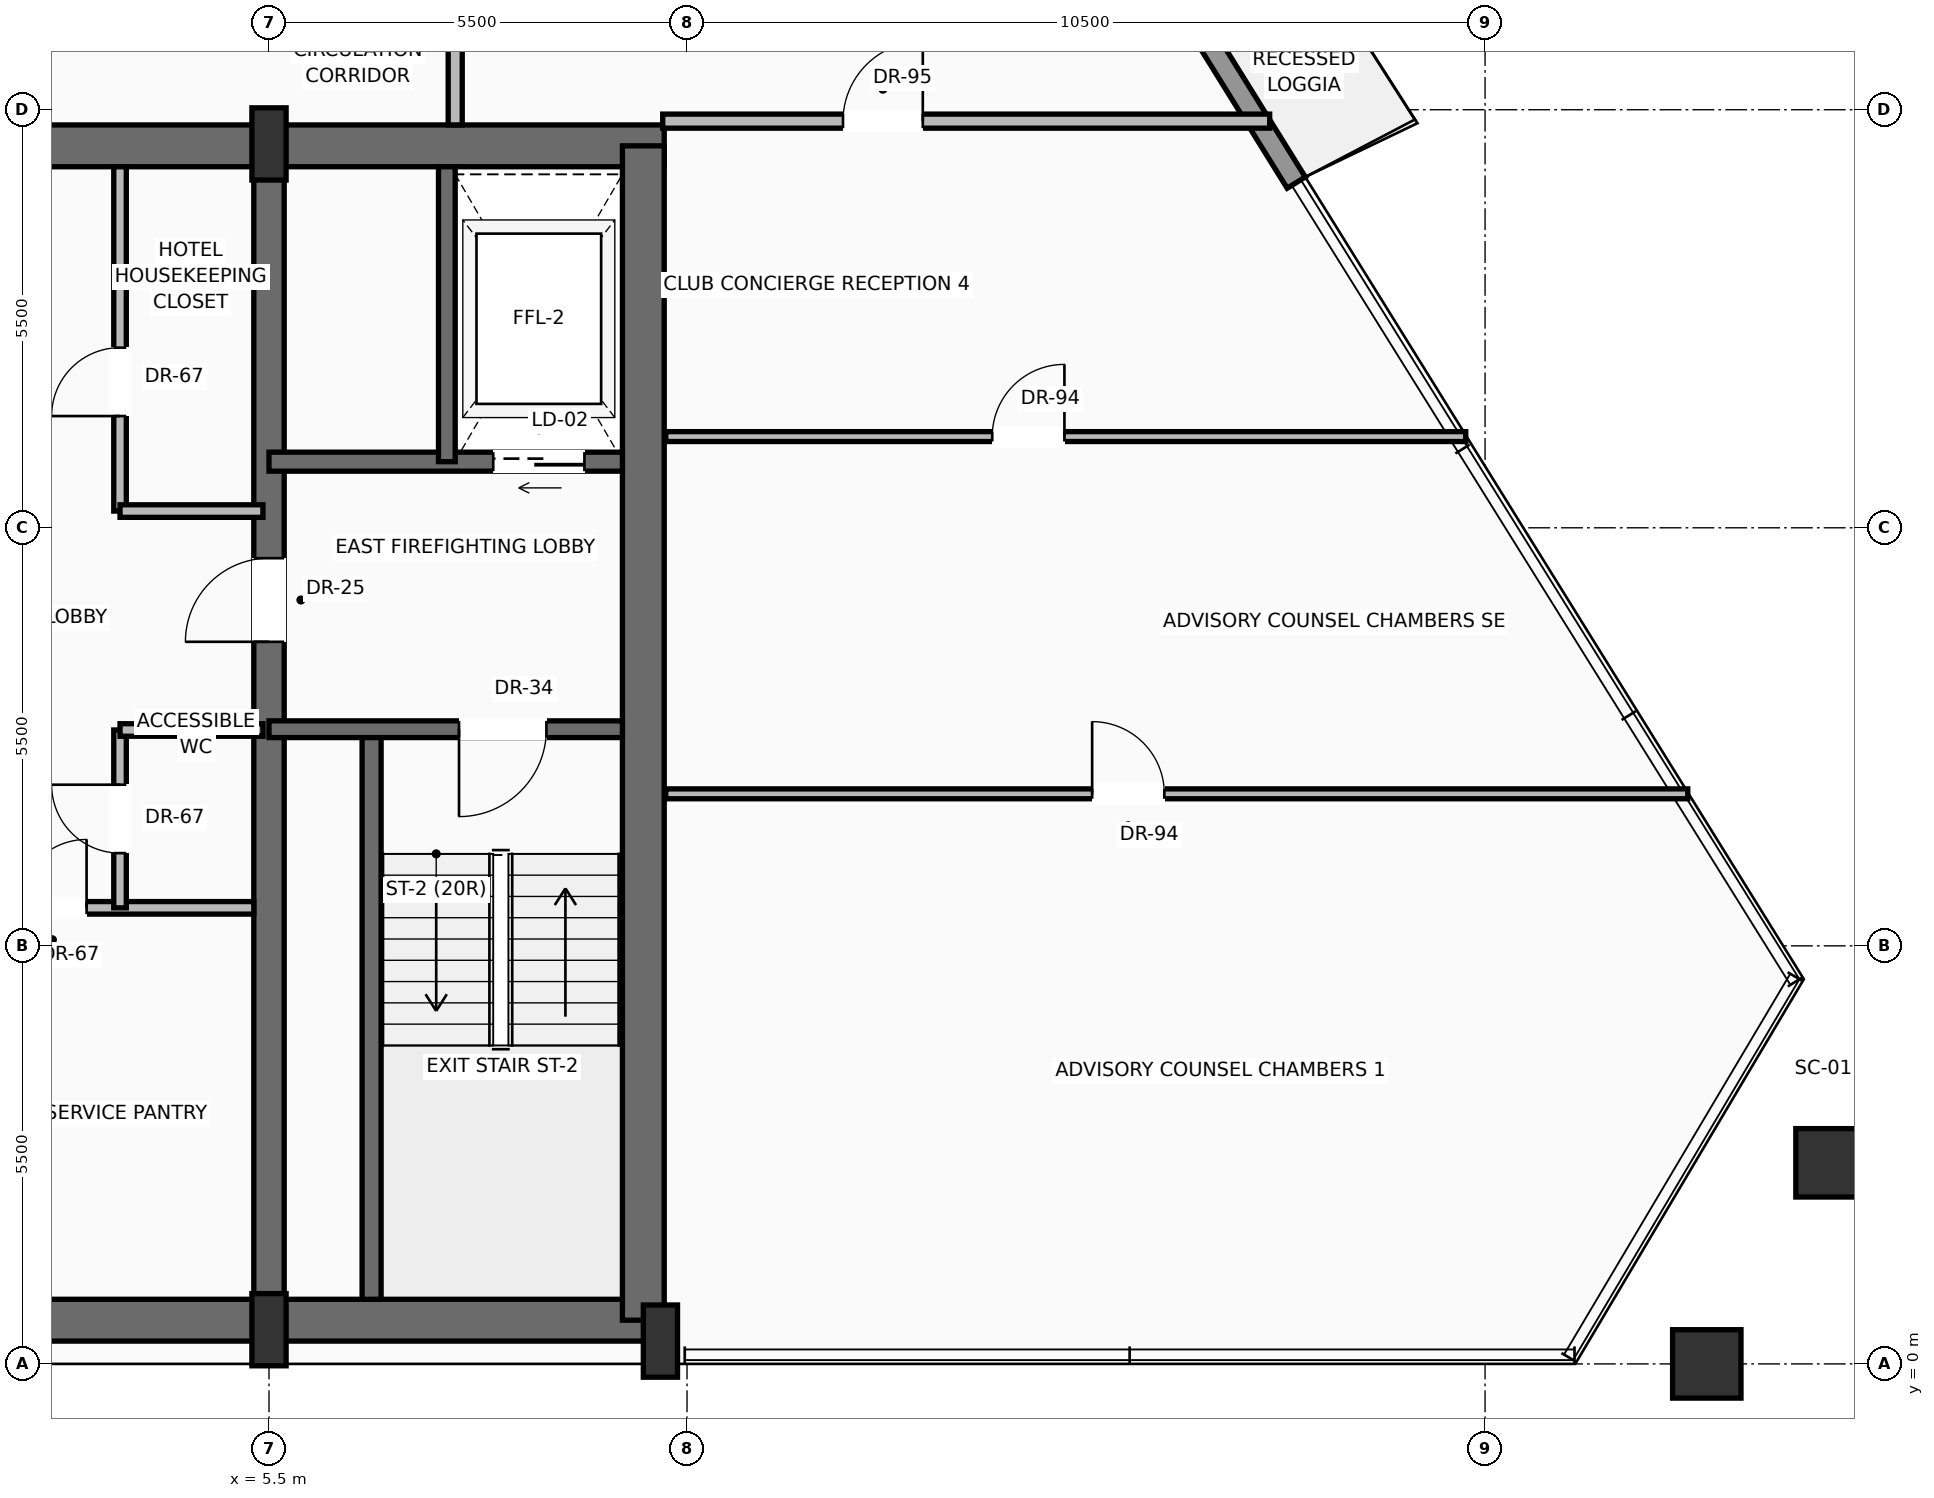
"""IFC4 building model, lengths in metres.
Left out: names, types, materials, properties, quantities, classifications, styles, units other than length and angle.
Written with IfcOpenShell. Run it as: python <this file> out.ifc"""

import sys

from ifc_helpers import new_model, si_unit, direction, frame, frame_2d, origin, origin_2d, place, context, subcontext, project, spatial, rectangle, hollow_rectangle, extrude, source, transform, mapped, element, fill, save


model = new_model("IFC4")
c1 = context("Model", 3, precision=1e-05, world=origin(), true_north=direction((0.0, 1.0)))
c2 = subcontext(c1, "Body", "Model", "MODEL_VIEW")
j1 = project(units=[si_unit("LENGTHUNIT", "METRE"), si_unit("PLANEANGLEUNIT", "RADIAN")], contexts=[c1])
p1 = place(None, origin())
s1 = spatial("IfcSite", under=j1, at=p1, CompositionType="ELEMENT")
p2 = place(p1, origin())
s2 = spatial("IfcBuilding", under=s1, at=p2, CompositionType="ELEMENT")
p3 = place(p2, frame((0.0, 0.0, 230.35)))
s3 = spatial("IfcBuildingStorey", under=s2, at=p3, CompositionType="ELEMENT", Elevation=230.35)
p4 = place(p3, frame((-10.65, 0.575, 0.0), z_axis=(0.0, 0.0, 1.0), x_axis=(1.0, 0.0, 0.0)))
e1 = element("IfcWall", 1, at=p4, inside=s3, PredefinedType="SHEAR", context=c2, shape_type="SweptSolid", body=[
    extrude(rectangle(XDim=21.3, YDim=0.55, at=frame_2d((10.65, 0.0))), origin(), (0.0, 0.0, 1.0), 3.24),
])
p5 = place(p3, frame((-10.7, 16.025, 0.0), z_axis=(0.0, 0.0, 1.0), x_axis=(1.0, 0.0, 0.0)))
e2 = element("IfcWall", 2, at=p5, inside=s3, PredefinedType="SHEAR", context=c2, shape_type="SweptSolid", body=[
    extrude(rectangle(XDim=21.4, YDim=0.55, at=frame_2d((10.7, 0.0))), origin(), (0.0, 0.0, 1.0), 3.24),
])
p6 = place(p5, frame((3.27, 0.0, 0.0)))
e3 = element("IfcOpeningElement", 3, at=p6, cuts=e2, PredefinedType="OPENING", context=c2, shape_type="SweptSolid", body=[
    extrude(rectangle(XDim=1.3, YDim=2.3, at=frame_2d((0.65, 1.15))), frame((0.0, 0.285, 0.0), z_axis=(0.0, -1.0, 0.0), x_axis=(1.0, 0.0, 0.0)), (0.0, 0.0, 1.0), 0.57),
])
p7 = place(p5, frame((9.7, 0.0, 0.0)))
e4 = element("IfcOpeningElement", 4, at=p7, cuts=e2, PredefinedType="OPENING", context=c2, shape_type="SweptSolid", body=[
    extrude(rectangle(XDim=2.0, YDim=2.4, at=frame_2d((1.0, 1.2))), frame((0.0, 0.285, 0.0), z_axis=(0.0, -1.0, 0.0), x_axis=(1.0, 0.0, 0.0)), (0.0, 0.0, 1.0), 0.57),
])
p8 = place(p3, frame((10.425, 0.575, 0.0), z_axis=(0.0, 0.0, 1.0), x_axis=(0.0, 1.0, 0.0)))
e5 = element("IfcWall", 5, at=p8, inside=s3, PredefinedType="SHEAR", context=c2, shape_type="SweptSolid", body=[
    extrude(rectangle(XDim=15.45, YDim=0.55, at=frame_2d((7.725, 0.0))), origin(), (0.0, 0.0, 1.0), 3.24),
])
p9 = place(p3, frame((5.5, 0.575, 0.0), z_axis=(0.0, 0.0, 1.0), x_axis=(0.0, 1.0, 0.0)))
e6 = element("IfcWall", 6, at=p9, inside=s3, PredefinedType="SHEAR", context=c2, shape_type="SweptSolid", body=[
    extrude(rectangle(XDim=15.45, YDim=0.4, at=frame_2d((7.725, 0.0))), origin(), (0.0, 0.0, 1.0), 3.24),
])
p10 = place(p9, frame((8.925, 0.0, 0.0)))
e7 = element("IfcOpeningElement", 7, at=p10, cuts=e6, PredefinedType="OPENING", context=c2, shape_type="SweptSolid", body=[
    extrude(rectangle(XDim=1.1, YDim=2.2, at=frame_2d((0.55, 1.1))), frame((0.0, 0.21, 0.0), z_axis=(0.0, -1.0, 0.0), x_axis=(1.0, 0.0, 0.0)), (0.0, 0.0, 1.0), 0.42),
])
m1 = source(origin(), c2, "Body", "SweptSolid", [
    extrude(rectangle(XDim=0.45, YDim=0.95, at=origin_2d()), origin(), (0.0, 0.0, 1.0), 3.45),
])
for number, where, z_axis, x_axis in (
    (8, (5.5, 0.45, 0.0), (0.0, 0.0, 1.0), (1.0, 0.0, 0.0)),
    (9, (10.65, 0.3, 0.0), (0.0, 0.0, 1.0), (1.0, 0.0, 0.0)),
    (10, (5.5, 16.05, 0.0), (0.0, 0.0, 1.0), (1.0, 0.0, 0.0)),
):
    element("IfcColumn", number, at=place(p3, frame(where, z_axis=z_axis, x_axis=x_axis)), inside=s3, PredefinedType="PILASTER", context=c2, shape_type="MappedRepresentation", body=[
        mapped(m1, transform((0.0, 0.0, 0.0), scale=1.0)),
    ])
m2 = source(origin(), c2, "Body", "SweptSolid", [
    extrude(hollow_rectangle(XDim=0.9, YDim=0.9, WallThickness=0.045, at=origin_2d()), origin(), (0.0, 0.0, 1.0), 3.441),
])
p11 = place(p3, frame((24.417, 0.0, 0.004), z_axis=(0.002057462832, 0.0, 0.999997883421), x_axis=(0.0, 1.0, 0.0)))
e11 = element("IfcColumn", 11, at=p11, inside=s3, PredefinedType="COLUMN", context=c2, shape_type="MappedRepresentation", body=[
    mapped(m2, transform((0.0, 0.0, 0.0), scale=1.0)),
])
m3 = source(origin(), c2, "Body", "SweptSolid", [
    extrude(hollow_rectangle(XDim=0.9, YDim=0.9, WallThickness=0.045, at=origin_2d()), origin(), (0.0, 0.0, 1.0), 3.442),
])
p12 = place(p3, frame((26.039, 2.646, 0.004), z_axis=(-0.00929239417, -0.016598627754, 0.999819052113), x_axis=(0.872569595673, -0.488489816381, 0.0)))
e12 = element("IfcColumn", 12, at=p12, inside=s3, PredefinedType="COLUMN", context=c2, shape_type="MappedRepresentation", body=[
    mapped(m3, transform((0.0, 0.0, 0.0), scale=1.0)),
])
p13 = place(p3, frame((8.708, 32.125, 0.0), z_axis=(0.0, 0.0, 1.0), x_axis=(0.527896829345, -0.849308505531, 0.0)))
e13 = element("IfcWall", 13, at=p13, inside=s3, PredefinedType="SOLIDWALL", context=c2, shape_type="SweptSolid", body=[
    extrude(rectangle(XDim=19.527, YDim=0.28, at=frame_2d((9.763, 0.0))), origin(), (0.0, 0.0, 1.0), 2.82),
])
p14 = place(p13, frame((4.686, 0.0, 0.0)))
e14 = element("IfcOpeningElement", 14, at=p14, cuts=e13, PredefinedType="OPENING", context=c2, shape_type="SweptSolid", body=[
    extrude(rectangle(XDim=1.6, YDim=2.35, at=frame_2d((0.8, 1.175))), frame((0.0, 0.15, 0.0), z_axis=(0.0, -1.0, 0.0), x_axis=(1.0, 0.0, 0.0)), (0.0, 0.0, 1.0), 0.3),
])
p15 = place(p13, frame((13.278, 0.0, 0.9)))
e15 = element("IfcOpeningElement", 15, at=p15, cuts=e13, PredefinedType="OPENING", context=c2, shape_type="SweptSolid", body=[
    extrude(rectangle(XDim=1.55, YDim=1.75, at=frame_2d((0.775, 0.875))), frame((0.0, 0.15, 0.0), z_axis=(0.0, -1.0, 0.0), x_axis=(1.0, 0.0, 0.0)), (0.0, 0.0, 1.0), 0.3),
])
p16 = place(p3, frame((6.85, 0.85, 0.0), z_axis=(0.0, 0.0, 1.0), x_axis=(0.0, 1.0, 0.0)))
e16 = element("IfcWall", 16, at=p16, inside=s3, PredefinedType="SOLIDWALL", context=c2, shape_type="SweptSolid", body=[
    extrude(rectangle(XDim=7.5, YDim=0.25, at=frame_2d((3.75, 0.0))), origin(), (0.0, 0.0, 1.0), 3.24),
])
p17 = place(p3, frame((10.15, 8.35, 0.0), z_axis=(0.0, 0.0, 1.0), x_axis=(-1.0, 0.0, 0.0)))
e17 = element("IfcWall", 17, at=p17, inside=s3, PredefinedType="SOLIDWALL", context=c2, shape_type="SweptSolid", body=[
    extrude(rectangle(XDim=4.65, YDim=0.22, at=frame_2d((2.325, 0.0))), origin(), (0.0, 0.0, 1.0), 3.24),
])
p18 = place(p17, frame((1.0, 0.0, 0.0)))
e18 = element("IfcOpeningElement", 18, at=p18, cuts=e17, PredefinedType="OPENING", context=c2, shape_type="SweptSolid", body=[
    extrude(rectangle(XDim=1.15, YDim=2.2, at=frame_2d((0.575, 1.1))), frame((0.0, 0.12, 0.0), z_axis=(0.0, -1.0, 0.0), x_axis=(1.0, 0.0, 0.0)), (0.0, 0.0, 1.0), 0.24),
])
p19 = place(p3, frame((10.15, 11.87, 0.0), z_axis=(0.0, 0.0, 1.0), x_axis=(-1.0, 0.0, 0.0)))
e19 = element("IfcWall", 19, at=p19, inside=s3, PredefinedType="SOLIDWALL", context=c2, shape_type="SweptSolid", body=[
    extrude(rectangle(XDim=4.65, YDim=0.25, at=frame_2d((2.325, 0.0))), origin(), (0.0, 0.0, 1.0), 3.24),
])
p20 = place(p19, frame((0.5, 0.0, 0.0)))
e20 = element("IfcOpeningElement", 20, at=p20, cuts=e19, PredefinedType="OPENING", context=c2, shape_type="SweptSolid", body=[
    extrude(rectangle(XDim=1.2, YDim=2.25, at=frame_2d((0.6, 1.125))), frame((0.0, 0.135, 0.0), z_axis=(0.0, -1.0, 0.0), x_axis=(1.0, 0.0, 0.0)), (0.0, 0.0, 1.0), 0.27),
])
p21 = place(p3, frame((7.84, 11.87, 0.0), z_axis=(0.0, 0.0, 1.0), x_axis=(0.0, 1.0, 0.0)))
e21 = element("IfcWall", 21, at=p21, inside=s3, PredefinedType="SOLIDWALL", context=c2, shape_type="SweptSolid", body=[
    extrude(rectangle(XDim=3.88, YDim=0.22, at=frame_2d((1.94, 0.0))), origin(), (0.0, 0.0, 1.0), 3.24),
])
p22 = place(p3, frame((-5.5, 6.0, 0.0), z_axis=(0.0, 0.0, 1.0), x_axis=(1.0, 0.0, 0.0)))
e22 = element("IfcWall", 22, at=p22, inside=s3, PredefinedType="PARTITIONING", context=c2, shape_type="SweptSolid", body=[
    extrude(rectangle(XDim=10.8, YDim=0.165, at=frame_2d((5.4, 0.0))), origin(), (0.0, 0.0, 1.0), 3.232),
])
p23 = place(p22, frame((7.7, 0.0, 0.0)))
e23 = element("IfcOpeningElement", 23, at=p23, cuts=e22, PredefinedType="OPENING", context=c2, shape_type="SweptSolid", body=[
    extrude(rectangle(XDim=0.9, YDim=2.1, at=frame_2d((0.45, 1.05))), frame((0.0, 0.093, 0.0), z_axis=(0.0, -1.0, 0.0), x_axis=(1.0, 0.0, 0.0)), (0.0, 0.0, 1.0), 0.185),
])
p24 = place(p3, frame((3.54, 6.0, 0.0), z_axis=(0.0, 0.0, 1.0), x_axis=(0.0, 1.0, 0.0)))
e24 = element("IfcWall", 24, at=p24, inside=s3, PredefinedType="PARTITIONING", context=c2, shape_type="SweptSolid", body=[
    extrude(rectangle(XDim=2.34, YDim=0.165, at=frame_2d((1.17, 0.0))), origin(), (0.0, 0.0, 1.0), 3.232),
])
p25 = place(p24, frame((0.72, 0.0, 0.0)))
e25 = element("IfcOpeningElement", 25, at=p25, cuts=e24, PredefinedType="OPENING", context=c2, shape_type="SweptSolid", body=[
    extrude(rectangle(XDim=0.9, YDim=2.1, at=frame_2d((0.45, 1.05))), frame((0.0, 0.093, 0.0), z_axis=(0.0, -1.0, 0.0), x_axis=(1.0, 0.0, 0.0)), (0.0, 0.0, 1.0), 0.185),
])
p26 = place(p3, frame((3.54, 8.34, 0.0), z_axis=(0.0, 0.0, 1.0), x_axis=(1.0, 0.0, 0.0)))
e26 = element("IfcWall", 26, at=p26, inside=s3, PredefinedType="PARTITIONING", context=c2, shape_type="SweptSolid", body=[
    extrude(rectangle(XDim=1.88, YDim=0.165, at=frame_2d((0.94, 0.0))), origin(), (0.0, 0.0, 1.0), 3.232),
])
p27 = place(p3, frame((3.54, 11.22, 0.0), z_axis=(0.0, 0.0, 1.0), x_axis=(0.0, 1.0, 0.0)))
e27 = element("IfcWall", 27, at=p27, inside=s3, PredefinedType="PARTITIONING", context=c2, shape_type="SweptSolid", body=[
    extrude(rectangle(XDim=4.53, YDim=0.165, at=frame_2d((2.265, 0.0))), origin(), (0.0, 0.0, 1.0), 3.232),
])
p28 = place(p27, frame((1.25, 0.0, 0.0)))
e28 = element("IfcOpeningElement", 28, at=p28, cuts=e27, PredefinedType="OPENING", context=c2, shape_type="SweptSolid", body=[
    extrude(rectangle(XDim=0.9, YDim=2.1, at=frame_2d((0.45, 1.05))), frame((0.0, 0.093, 0.0), z_axis=(0.0, -1.0, 0.0), x_axis=(1.0, 0.0, 0.0)), (0.0, 0.0, 1.0), 0.185),
])
p29 = place(p3, frame((3.54, 11.22, 0.0), z_axis=(0.0, 0.0, 1.0), x_axis=(1.0, 0.0, 0.0)))
e29 = element("IfcWall", 29, at=p29, inside=s3, PredefinedType="PARTITIONING", context=c2, shape_type="SweptSolid", body=[
    extrude(rectangle(XDim=1.88, YDim=0.165, at=frame_2d((0.94, 0.0))), origin(), (0.0, 0.0, 1.0), 3.232),
])
p30 = place(p3, frame((7.95, 16.3, 0.0), z_axis=(0.0, 0.0, 1.0), x_axis=(0.0, 1.0, 0.0)))
e30 = element("IfcWall", 30, at=p30, inside=s3, PredefinedType="PARTITIONING", context=c2, shape_type="SweptSolid", body=[
    extrude(rectangle(XDim=10.5, YDim=0.185, at=frame_2d((5.25, 0.0))), origin(), (0.0, 0.0, 1.0), 3.232),
])
p31 = place(p30, frame((3.088, 0.0, 0.0)))
e31 = element("IfcOpeningElement", 31, at=p31, cuts=e30, PredefinedType="OPENING", context=c2, shape_type="SweptSolid", body=[
    extrude(rectangle(XDim=1.05, YDim=2.25, at=frame_2d((0.525, 1.125))), frame((0.0, 0.103, 0.0), z_axis=(0.0, -1.0, 0.0), x_axis=(1.0, 0.0, 0.0)), (0.0, 0.0, 1.0), 0.205),
])
p32 = place(p3, frame((10.68, 16.35, 0.0), z_axis=(0.0, 0.0, 1.0), x_axis=(1.0, 0.0, 0.0)))
e32 = element("IfcWall", 32, at=p32, inside=s3, PredefinedType="PARTITIONING", context=c2, shape_type="SweptSolid", body=[
    extrude(rectangle(XDim=7.986, YDim=0.185, at=frame_2d((3.993, 0.0))), origin(), (0.0, 0.0, 1.0), 3.232),
])
p33 = place(p32, frame((2.372, 0.0, 0.0)))
e33 = element("IfcOpeningElement", 33, at=p33, cuts=e32, PredefinedType="OPENING", context=c2, shape_type="SweptSolid", body=[
    extrude(rectangle(XDim=1.05, YDim=2.25, at=frame_2d((0.525, 1.125))), frame((0.0, 0.103, 0.0), z_axis=(0.0, -1.0, 0.0), x_axis=(1.0, 0.0, 0.0)), (0.0, 0.0, 1.0), 0.205),
])
p34 = place(p3, frame((10.72, 7.5, 0.0), z_axis=(0.0, 0.0, 1.0), x_axis=(1.0, 0.0, 0.0)))
e34 = element("IfcWall", 34, at=p34, inside=s3, PredefinedType="PARTITIONING", context=c2, shape_type="SweptSolid", body=[
    extrude(rectangle(XDim=13.447, YDim=0.13, at=frame_2d((6.724, 0.0))), origin(), (0.0, 0.0, 1.0), 3.232),
])
p35 = place(p34, frame((5.61, 0.0, 0.0)))
e35 = element("IfcOpeningElement", 35, at=p35, cuts=e34, PredefinedType="OPENING", context=c2, shape_type="SweptSolid", body=[
    extrude(rectangle(XDim=0.95, YDim=2.2, at=frame_2d((0.475, 1.1))), frame((0.0, 0.075, 0.0), z_axis=(0.0, -1.0, 0.0), x_axis=(1.0, 0.0, 0.0)), (0.0, 0.0, 1.0), 0.15),
])
p36 = place(p3, frame((10.72, 12.2, 0.0), z_axis=(0.0, 0.0, 1.0), x_axis=(1.0, 0.0, 0.0)))
e36 = element("IfcWall", 36, at=p36, inside=s3, PredefinedType="PARTITIONING", context=c2, shape_type="SweptSolid", body=[
    extrude(rectangle(XDim=10.526, YDim=0.13, at=frame_2d((5.263, 0.0))), origin(), (0.0, 0.0, 1.0), 3.232),
])
p37 = place(p36, frame((4.295, 0.0, 0.0)))
e37 = element("IfcOpeningElement", 37, at=p37, cuts=e36, PredefinedType="OPENING", context=c2, shape_type="SweptSolid", body=[
    extrude(rectangle(XDim=0.95, YDim=2.2, at=frame_2d((0.475, 1.1))), frame((0.0, 0.075, 0.0), z_axis=(0.0, -1.0, 0.0), x_axis=(1.0, 0.0, 0.0)), (0.0, 0.0, 1.0), 0.15),
])
m4 = source(origin(), c2, "Body", "SweptSolid", [
    extrude(rectangle(XDim=1.15, YDim=2.2, at=frame_2d((0.575, 1.1))), frame((0.0, 0.025, 0.0), z_axis=(0.0, -1.0, 0.0), x_axis=(1.0, 0.0, 0.0)), (0.0, 0.0, 1.0), 0.05),
])
p38 = place(p18, origin())
e38 = element("IfcDoor", 38, at=p38, inside=s3, OperationType="SINGLE_SWING_RIGHT", PredefinedType="DOOR", context=c2, shape_type="MappedRepresentation", body=[
    mapped(m4, transform((0.0, 0.0, 0.0), scale=1.0)),
])
fill(e18, e38)
m5 = source(origin(), c2, "Body", "SweptSolid", [
    extrude(rectangle(XDim=1.1, YDim=2.2, at=frame_2d((0.55, 1.1))), frame((0.0, 0.025, 0.0), z_axis=(0.0, -1.0, 0.0), x_axis=(1.0, 0.0, 0.0)), (0.0, 0.0, 1.0), 0.05),
])
p39 = place(p10, origin())
e39 = element("IfcDoor", 39, at=p39, inside=s3, OperationType="SINGLE_SWING_LEFT", PredefinedType="DOOR", context=c2, shape_type="MappedRepresentation", body=[
    mapped(m5, transform((0.0, 0.0, 0.0), scale=1.0)),
])
fill(e7, e39)
m6 = source(origin(), c2, "Body", "SweptSolid", [
    extrude(rectangle(XDim=1.2, YDim=2.25, at=frame_2d((0.6, 1.125))), frame((0.0, 0.025, 0.0), z_axis=(0.0, -1.0, 0.0), x_axis=(1.0, 0.0, 0.0)), (0.0, 0.0, 1.0), 0.05),
])
p40 = place(p20, origin())
e40 = element("IfcDoor", 40, at=p40, inside=s3, OperationType="SLIDING_TO_RIGHT", PredefinedType="DOOR", context=c2, shape_type="MappedRepresentation", body=[
    mapped(m6, transform((0.0, 0.0, 0.0), scale=1.0)),
])
fill(e20, e40)
m7 = source(origin(), c2, "Body", "SweptSolid", [
    extrude(rectangle(XDim=0.9, YDim=2.1, at=frame_2d((0.45, 1.05))), frame((0.0, 0.025, 0.0), z_axis=(0.0, -1.0, 0.0), x_axis=(1.0, 0.0, 0.0)), (0.0, 0.0, 1.0), 0.05),
])
p41 = place(p23, origin())
e41 = element("IfcDoor", 41, at=p41, inside=s3, OperationType="SINGLE_SWING_RIGHT", PredefinedType="DOOR", context=c2, shape_type="MappedRepresentation", body=[
    mapped(m7, transform((0.0, 0.0, 0.0), scale=1.0)),
])
fill(e23, e41)
p42 = place(p25, origin())
e42 = element("IfcDoor", 42, at=p42, inside=s3, OperationType="SINGLE_SWING_RIGHT", PredefinedType="DOOR", context=c2, shape_type="MappedRepresentation", body=[
    mapped(m7, transform((0.0, 0.0, 0.0), scale=1.0)),
])
fill(e25, e42)
p43 = place(p28, origin())
e43 = element("IfcDoor", 43, at=p43, inside=s3, OperationType="SINGLE_SWING_LEFT", PredefinedType="DOOR", context=c2, shape_type="MappedRepresentation", body=[
    mapped(m7, transform((0.0, 0.0, 0.0), scale=1.0)),
])
fill(e28, e43)
m8 = source(origin(), c2, "Body", "SweptSolid", [
    extrude(rectangle(XDim=1.05, YDim=2.25, at=frame_2d((0.525, 1.125))), frame((0.0, 0.025, 0.0), z_axis=(0.0, -1.0, 0.0), x_axis=(1.0, 0.0, 0.0)), (0.0, 0.0, 1.0), 0.05),
])
p44 = place(p33, origin())
e44 = element("IfcDoor", 44, at=p44, inside=s3, OperationType="SINGLE_SWING_RIGHT", PredefinedType="DOOR", context=c2, shape_type="MappedRepresentation", body=[
    mapped(m8, transform((0.0, 0.0, 0.0), scale=1.0)),
])
fill(e33, e44)
m9 = source(origin(), c2, "Body", "SweptSolid", [
    extrude(rectangle(XDim=0.95, YDim=2.2, at=frame_2d((0.475, 1.1))), frame((0.0, 0.025, 0.0), z_axis=(0.0, -1.0, 0.0), x_axis=(1.0, 0.0, 0.0)), (0.0, 0.0, 1.0), 0.05),
])
p45 = place(p35, origin())
e45 = element("IfcDoor", 45, at=p45, inside=s3, OperationType="SINGLE_SWING_LEFT", PredefinedType="DOOR", context=c2, shape_type="MappedRepresentation", body=[
    mapped(m9, transform((0.0, 0.0, 0.0), scale=1.0)),
])
fill(e35, e45)
p46 = place(p37, origin())
e46 = element("IfcDoor", 46, at=p46, inside=s3, OperationType="SINGLE_SWING_RIGHT", PredefinedType="DOOR", context=c2, shape_type="MappedRepresentation", body=[
    mapped(m9, transform((0.0, 0.0, 0.0), scale=1.0)),
])
fill(e37, e46)
save(model, sys.argv[1])
